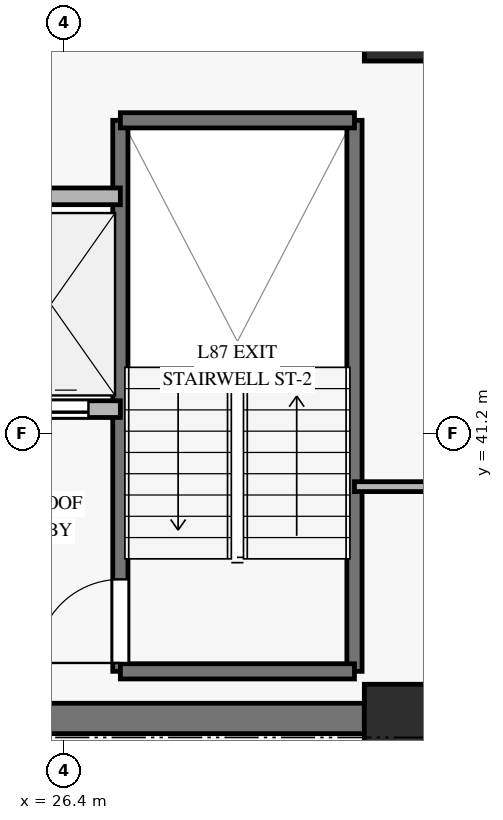
"""IFC4 building model, lengths in metres.
Left out: names, types, materials, properties, quantities, classifications, styles, units other than length and angle.
Written with IfcOpenShell. Run it as: python <this file> out.ifc"""

import sys

from ifc_helpers import new_model, si_unit, direction, frame, frame_2d, origin, origin_2d, place, context, subcontext, project, spatial, rectangle, extrude, source, transform, mapped, element, fill, save


model = new_model("IFC4")
c1 = context("Model", 3, precision=1e-05, world=origin(), true_north=direction((0.0, 1.0)))
c2 = subcontext(c1, "Body", "Model", "MODEL_VIEW")
j1 = project(units=[si_unit("LENGTHUNIT", "METRE"), si_unit("PLANEANGLEUNIT", "RADIAN")], contexts=[c1])
p1 = place(None, origin())
s1 = spatial("IfcSite", under=j1, at=p1, CompositionType="ELEMENT")
p2 = place(p1, origin())
s2 = spatial("IfcBuilding", under=s1, at=p2, CompositionType="ELEMENT")
p3 = place(p2, frame((0.0, 0.0, 335.7)))
s3 = spatial("IfcBuildingStorey", under=s2, at=p3, CompositionType="ELEMENT", Elevation=335.7)
m1 = source(origin(), c2, "Body", "SweptSolid", [
    extrude(rectangle(XDim=0.9, YDim=0.9, at=origin_2d()), origin(), (0.0, 0.0, 1.0), 3.185),
])
for number, where, z_axis, x_axis in (
    (1, (30.8, 37.45, 0.0), (0.0, 0.0, 1.0), (1.0, 0.0, 0.0)),
    (2, (30.8, 46.55, 0.0), (0.0, 0.0, 1.0), (1.0, 0.0, 0.0)),
):
    element("IfcColumn", number, at=place(p3, frame(where, z_axis=z_axis, x_axis=x_axis)), inside=s3, PredefinedType="PILASTER", context=c2, shape_type="MappedRepresentation", body=[
        mapped(m1, transform((0.0, 0.0, 0.0), x_axis=(1.0, 0.0, 0.0), y_axis=(0.0, 1.0, 0.0), z_axis=(0.0, 0.0, 1.0), scale=1.0)),
    ])
p4 = place(p3, frame((20.3, 37.45, 0.0), z_axis=(0.0, 0.0, 1.0), x_axis=(1.0, 0.0, 0.0)))
e3 = element("IfcWall", 3, at=p4, inside=s3, PredefinedType="SHEAR", context=c2, shape_type="SweptSolid", body=[
    extrude(rectangle(XDim=10.05, YDim=0.4, at=frame_2d((5.025, 0.0))), origin(), (0.0, 0.0, 1.0), 3.185),
])
p5 = place(p4, frame((4.25, 0.0, 0.0)))
e4 = element("IfcOpeningElement", 4, at=p5, cuts=e3, PredefinedType="OPENING", context=c2, shape_type="SweptSolid", body=[
    extrude(rectangle(XDim=1.2, YDim=2.15, at=frame_2d((0.6, 1.075))), frame((0.0, 0.21, 0.0), z_axis=(0.0, -1.0, 0.0), x_axis=(1.0, 0.0, 0.0)), (0.0, 0.0, 1.0), 0.42),
])
p6 = place(p3, frame((27.14, 38.07, 0.0), z_axis=(0.0, 0.0, 1.0), x_axis=(0.0, 1.0, 0.0)))
e5 = element("IfcWall", 5, at=p6, inside=s3, PredefinedType="SOLIDWALL", context=c2, shape_type="SweptSolid", body=[
    extrude(rectangle(XDim=7.25, YDim=0.2, at=frame_2d((3.625, 0.0))), origin(), (0.0, 0.0, 1.0), 3.4),
])
p7 = place(p6, frame((0.11, 0.0, 0.0)))
e6 = element("IfcOpeningElement", 6, at=p7, cuts=e5, PredefinedType="OPENING", context=c2, shape_type="SweptSolid", body=[
    extrude(rectangle(XDim=1.1, YDim=2.15, at=frame_2d((0.55, 1.075))), frame((0.0, 0.11, 0.0), z_axis=(0.0, -1.0, 0.0), x_axis=(1.0, 0.0, 0.0)), (0.0, 0.0, 1.0), 0.22),
])
p8 = place(p3, frame((30.22, 38.07, 0.0), z_axis=(0.0, 0.0, 1.0), x_axis=(0.0, 1.0, 0.0)))
e7 = element("IfcWall", 7, at=p8, inside=s3, PredefinedType="SOLIDWALL", context=c2, shape_type="SweptSolid", body=[
    extrude(rectangle(XDim=7.25, YDim=0.2, at=frame_2d((3.625, 0.0))), origin(), (0.0, 0.0, 1.0), 3.4),
])
for number, where, z_axis, x_axis in (
    (8, (27.14, 45.32, 0.0), (0.0, 0.0, 1.0), (1.0, 0.0, 0.0)),
    (9, (27.14, 38.07, 0.0), (0.0, 0.0, 1.0), (1.0, 0.0, 0.0)),
):
    element("IfcWall", number, at=place(p3, frame(where, z_axis=z_axis, x_axis=x_axis)), inside=s3, PredefinedType="SOLIDWALL", context=c2, shape_type="SweptSolid", body=[
        extrude(rectangle(XDim=3.08, YDim=0.2, at=frame_2d((1.54, 0.0))), origin(), (0.0, 0.0, 1.0), 3.4),
    ])
p9 = place(p3, frame((23.22, 41.52, 0.0), z_axis=(0.0, 0.0, 1.0), x_axis=(1.0, 0.0, 0.0)))
e10 = element("IfcWall", 10, at=p9, inside=s3, PredefinedType="SOLIDWALL", context=c2, shape_type="SweptSolid", body=[
    extrude(rectangle(XDim=3.92, YDim=0.22, at=frame_2d((1.96, 0.0))), origin(), (0.0, 0.0, 1.0), 3.185),
])
p10 = place(p9, frame((0.5, 0.0, 0.0)))
e11 = element("IfcOpeningElement", 11, at=p10, cuts=e10, PredefinedType="OPENING", context=c2, shape_type="SweptSolid", body=[
    extrude(rectangle(XDim=1.1, YDim=2.2, at=frame_2d((0.55, 1.1))), frame((0.0, 0.12, 0.0), z_axis=(0.0, -1.0, 0.0), x_axis=(1.0, 0.0, 0.0)), (0.0, 0.0, 1.0), 0.24),
])
p11 = place(p9, frame((2.4, 0.0, 0.0)))
e12 = element("IfcOpeningElement", 12, at=p11, cuts=e10, PredefinedType="OPENING", context=c2, shape_type="SweptSolid", body=[
    extrude(rectangle(XDim=1.1, YDim=2.2, at=frame_2d((0.55, 1.1))), frame((0.0, 0.12, 0.0), z_axis=(0.0, -1.0, 0.0), x_axis=(1.0, 0.0, 0.0)), (0.0, 0.0, 1.0), 0.24),
])
p12 = place(p3, frame((23.22, 44.32, 0.0), z_axis=(0.0, 0.0, 1.0), x_axis=(1.0, 0.0, 0.0)))
e13 = element("IfcWall", 13, at=p12, inside=s3, PredefinedType="SOLIDWALL", context=c2, shape_type="SweptSolid", body=[
    extrude(rectangle(XDim=3.92, YDim=0.22, at=frame_2d((1.96, 0.0))), origin(), (0.0, 0.0, 1.0), 3.185),
])
p13 = place(p3, frame((30.22, 40.5, 0.0), z_axis=(0.0, 0.0, 1.0), x_axis=(1.0, 0.0, 0.0)))
e14 = element("IfcWall", 14, at=p13, inside=s3, PredefinedType="PARTITIONING", context=c2, shape_type="SweptSolid", body=[
    extrude(rectangle(XDim=2.96, YDim=0.13, at=frame_2d((1.48, 0.0))), origin(), (0.0, 0.0, 1.0), 2.47),
])
m2 = source(origin(), c2, "Body", "SweptSolid", [
    extrude(rectangle(XDim=1.1, YDim=2.15, at=frame_2d((0.55, 1.075))), frame((0.0, 0.025, 0.0), z_axis=(0.0, -1.0, 0.0), x_axis=(1.0, 0.0, 0.0)), (0.0, 0.0, 1.0), 0.05),
])
p14 = place(p7, origin())
e15 = element("IfcDoor", 15, at=p14, inside=s3, OperationType="SINGLE_SWING_LEFT", PredefinedType="DOOR", context=c2, shape_type="MappedRepresentation", body=[
    mapped(m2, transform((0.0, 0.0, 0.0), x_axis=(1.0, 0.0, 0.0), y_axis=(0.0, 1.0, 0.0), z_axis=(0.0, 0.0, 1.0), scale=1.0)),
])
fill(e6, e15)
m3 = source(origin(), c2, "Body", "SweptSolid", [
    extrude(rectangle(XDim=1.1, YDim=2.2, at=frame_2d((0.55, 1.1))), frame((0.0, 0.025, 0.0), z_axis=(0.0, -1.0, 0.0), x_axis=(1.0, 0.0, 0.0)), (0.0, 0.0, 1.0), 0.05),
])
p15 = place(p11, origin())
e16 = element("IfcDoor", 16, at=p15, inside=s3, OperationType="SLIDING_TO_LEFT", PredefinedType="DOOR", context=c2, shape_type="MappedRepresentation", body=[
    mapped(m3, transform((0.0, 0.0, 0.0), x_axis=(1.0, 0.0, 0.0), y_axis=(0.0, 1.0, 0.0), z_axis=(0.0, 0.0, 1.0), scale=1.0)),
])
fill(e12, e16)
save(model, sys.argv[1])
